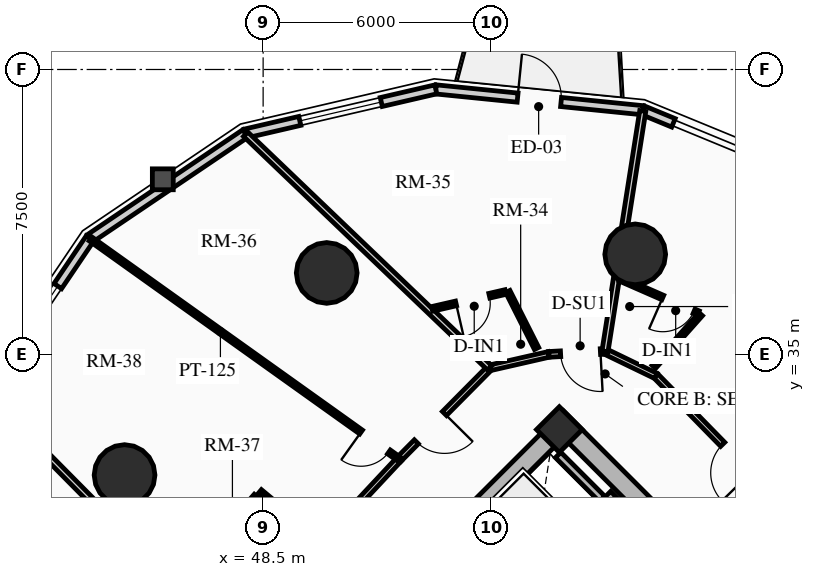
"""IFC4 building model, lengths in metres.
Left out: names, types, materials, properties, quantities, classifications, styles, units other than length and angle.
Written with IfcOpenShell. Run it as: python <this file> out.ifc"""

import sys

from ifc_helpers import new_model, si_unit, direction, frame, frame_2d, origin, origin_2d, place, context, subcontext, project, spatial, rectangle, circle, extrude, source, transform, mapped, element, fill, save


model = new_model("IFC4")
c1 = context("Model", 3, precision=1e-05, world=origin(), true_north=direction((0.0, 1.0)))
c2 = subcontext(c1, "Body", "Model", "MODEL_VIEW")
j1 = project(units=[si_unit("LENGTHUNIT", "METRE"), si_unit("PLANEANGLEUNIT", "RADIAN")], contexts=[c1])
p1 = place(None, origin())
s1 = spatial("IfcSite", under=j1, at=p1, CompositionType="ELEMENT")
p2 = place(p1, origin())
s2 = spatial("IfcBuilding", under=s1, at=p2, CompositionType="ELEMENT")
p3 = place(p2, frame((0.0, 0.0, 51.1)))
s3 = spatial("IfcBuildingStorey", under=s2, at=p3, CompositionType="ELEMENT", Elevation=51.1)
p4 = place(p3, frame((66.339, 23.227, 0.0), z_axis=(0.0, 0.0, 1.0), x_axis=(-0.707106781187, 0.707106781187, 0.0)))
e1 = element("IfcWall", 1, at=p4, inside=s3, PredefinedType="SHEAR", context=c2, shape_type="SweptSolid", body=[
    extrude(rectangle(XDim=14.3, YDim=0.5, at=frame_2d((7.15, 0.0))), origin(), (0.0, 0.0, 1.0), 2.91),
])
p5 = place(p3, frame((48.838, 25.596, 0.0), z_axis=(0.0, 0.0, 1.0), x_axis=(0.707106781187, 0.707106781187, 0.0)))
e2 = element("IfcWall", 2, at=p5, inside=s3, PredefinedType="SHEAR", context=c2, shape_type="SweptSolid", body=[
    extrude(rectangle(XDim=10.7, YDim=0.5, at=frame_2d((5.35, 0.0))), origin(), (0.0, 0.0, 1.0), 2.91),
])
m1 = source(origin(), c2, "Body", "SweptSolid", [
    extrude(rectangle(XDim=1.5, YDim=2.02, at=frame_2d((0.75, 1.01))), frame((0.0, 0.26, 0.0), z_axis=(0.0, -1.0, 0.0), x_axis=(1.0, 0.0, 0.0)), (0.0, 0.0, 1.0), 0.52),
])
p6 = place(p5, frame((4.6, 0.0, 0.0)))
e3 = element("IfcOpeningElement", 3, at=p6, cuts=e2, PredefinedType="OPENING", context=c2, shape_type="MappedRepresentation", body=[
    mapped(m1, transform((0.0, 0.0, 0.0), x_axis=(1.0, 0.0, 0.0), y_axis=(0.0, 1.0, 0.0), z_axis=(0.0, 0.0, 1.0), scale=1.0)),
])
p7 = place(p3, frame((56.294, 33.024, 0.0), z_axis=(0.0, 0.0, 1.0), x_axis=(0.707106781187, 0.707106781187, 0.0)))
e4 = element("IfcColumn", 4, at=p7, inside=s3, PredefinedType="COLUMN", context=c2, shape_type="SweptSolid", body=[
    extrude(rectangle(XDim=0.85, YDim=0.85, at=origin_2d()), origin(), (0.0, 0.0, 1.0), 2.91),
])
for number, where, z_axis, x_axis in (
    (5, (58.291, 37.635, 0.0), (0.0, 0.0, 1.0), (1.0, 0.0, 0.0)),
    (6, (50.173, 37.146, 0.0), (0.0, 0.0, 1.0), (1.0, 0.0, 0.0)),
    (7, (44.854, 31.827, 0.0), (0.0, 0.0, 1.0), (1.0, 0.0, 0.0)),
):
    element("IfcColumn", number, at=place(p3, frame(where, z_axis=z_axis, x_axis=x_axis)), inside=s3, PredefinedType="USERDEFINED", context=c2, shape_type="SweptSolid", body=[
        extrude(circle(Radius=0.8, at=origin_2d()), origin(), (0.0, 0.0, 1.0), 2.91),
    ])
p8 = place(p3, frame((58.493, 41.428, 0.0), z_axis=(0.0, 0.0, 1.0), x_axis=(0.924556017656, -0.381046152345, 0.0)))
e8 = element("IfcWall", 8, at=p8, inside=s3, PredefinedType="SOLIDWALL", context=c2, shape_type="SweptSolid", body=[
    extrude(rectangle(XDim=0.87, YDim=0.24, at=frame_2d((0.435, 0.0))), origin(), (0.0, 0.0, 1.0), 2.073),
])
p9 = place(p3, frame((53.043, 41.976, 0.0), z_axis=(0.0, 0.0, 1.0), x_axis=(0.994970765694, -0.100165739718, 0.0)))
e9 = element("IfcWall", 9, at=p9, inside=s3, PredefinedType="SOLIDWALL", context=c2, shape_type="SweptSolid", body=[
    extrude(rectangle(XDim=5.477, YDim=0.24, at=frame_2d((2.738, 0.0))), origin(), (0.0, 0.0, 1.0), 2.073),
])
m2 = source(origin(), c2, "Body", "SweptSolid", [
    extrude(rectangle(XDim=1.15, YDim=2.005, at=frame_2d((0.575, 1.002))), frame((0.0, 0.13, 0.0), z_axis=(0.0, -1.0, 0.0), x_axis=(1.0, 0.0, 0.0)), (0.0, 0.0, 1.0), 0.26),
])
p10 = place(p9, frame((2.163, 0.0, 0.0)))
e10 = element("IfcOpeningElement", 10, at=p10, cuts=e9, PredefinedType="OPENING", context=c2, shape_type="MappedRepresentation", body=[
    mapped(m2, transform((0.0, 0.0, 0.0), x_axis=(1.0, 0.0, 0.0), y_axis=(0.0, 1.0, 0.0), z_axis=(0.0, 0.0, 1.0), scale=1.0)),
])
p11 = place(p3, frame((48.031, 40.814, 0.0), z_axis=(0.0, 0.0, 1.0), x_axis=(0.974166016949, 0.225833060959, 0.0)))
e11 = element("IfcWall", 11, at=p11, inside=s3, PredefinedType="SOLIDWALL", context=c2, shape_type="SweptSolid", body=[
    extrude(rectangle(XDim=5.146, YDim=0.24, at=frame_2d((2.573, 0.0))), origin(), (0.0, 0.0, 1.0), 2.073),
])
m3 = source(origin(), c2, "Body", "SweptSolid", [
    extrude(rectangle(XDim=2.2, YDim=1.35, at=frame_2d((1.1, 0.675))), frame((0.0, 0.13, 0.0), z_axis=(0.0, -1.0, 0.0), x_axis=(1.0, 0.0, 0.0)), (0.0, 0.0, 1.0), 0.26),
])
p12 = place(p11, frame((1.473, 0.0, 0.65)))
e12 = element("IfcOpeningElement", 12, at=p12, cuts=e11, PredefinedType="OPENING", context=c2, shape_type="MappedRepresentation", body=[
    mapped(m3, transform((0.0, 0.0, 0.0), x_axis=(1.0, 0.0, 0.0), y_axis=(0.0, 1.0, 0.0), z_axis=(0.0, 0.0, 1.0), scale=1.0)),
])
p13 = place(p3, frame((43.945, 38.055, 0.0), z_axis=(0.0, 0.0, 1.0), x_axis=(0.828736708604, 0.559638693991, 0.0)))
e13 = element("IfcWall", 13, at=p13, inside=s3, PredefinedType="SOLIDWALL", context=c2, shape_type="SweptSolid", body=[
    extrude(rectangle(XDim=4.93, YDim=0.24, at=frame_2d((2.465, 0.0))), origin(), (0.0, 0.0, 1.0), 2.073),
])
p14 = place(p3, frame((41.186, 33.969, 0.0), z_axis=(0.0, 0.0, 1.0), x_axis=(0.559638693991, 0.828736708604, 0.0)))
e14 = element("IfcWall", 14, at=p14, inside=s3, PredefinedType="SOLIDWALL", context=c2, shape_type="SweptSolid", body=[
    extrude(rectangle(XDim=4.93, YDim=0.24, at=frame_2d((2.465, 0.0))), origin(), (0.0, 0.0, 1.0), 2.073),
])
m4 = source(origin(), c2, "Body", "SweptSolid", [
    extrude(rectangle(XDim=1.9, YDim=1.35, at=frame_2d((0.95, 0.675))), frame((0.0, 0.13, 0.0), z_axis=(0.0, -1.0, 0.0), x_axis=(1.0, 0.0, 0.0)), (0.0, 0.0, 1.0), 0.26),
])
p15 = place(p14, frame((1.515, 0.0, 0.65)))
e15 = element("IfcOpeningElement", 15, at=p15, cuts=e14, PredefinedType="OPENING", context=c2, shape_type="MappedRepresentation", body=[
    mapped(m4, transform((0.0, 0.0, 0.0), x_axis=(1.0, 0.0, 0.0), y_axis=(0.0, 1.0, 0.0), z_axis=(0.0, 0.0, 1.0), scale=1.0)),
])
p16 = place(p3, frame((55.615, 29.227, 0.0), z_axis=(0.0, 0.0, 1.0), x_axis=(0.707147878904, 0.70706568108, 0.0)))
e16 = element("IfcWall", 16, at=p16, inside=s3, PredefinedType="SHEAR", context=c2, shape_type="SweptSolid", body=[
    extrude(rectangle(XDim=2.97, YDim=0.2, at=frame_2d((1.485, 0.0))), origin(), (0.0, 0.0, 1.0), 2.91),
])
p17 = place(p3, frame((57.419, 31.2, 0.0), z_axis=(0.0, 0.0, 1.0), x_axis=(-0.707032117043, 0.707181437447, 0.0)))
e17 = element("IfcWall", 17, at=p17, inside=s3, PredefinedType="SHEAR", context=c2, shape_type="SweptSolid", body=[
    extrude(rectangle(XDim=1.635, YDim=0.2, at=frame_2d((0.817, 0.0))), origin(), (0.0, 0.0, 1.0), 2.91),
])
p18 = place(p3, frame((63.086, 30.086, 0.0), z_axis=(0.0, 0.0, 1.0), x_axis=(-0.699032802832, 0.715089603172, 0.0)))
e18 = element("IfcWall", 18, at=p18, inside=s3, PredefinedType="PARTITIONING", context=c2, shape_type="SweptSolid", body=[
    extrude(rectangle(XDim=6.082, YDim=0.15, at=frame_2d((3.041, 0.0))), origin(), (0.0, 0.0, 1.0), 2.159),
])
m5 = source(origin(), c2, "Body", "SweptSolid", [
    extrude(rectangle(XDim=1.05, YDim=2.015, at=frame_2d((0.525, 1.007))), frame((0.0, 0.085, 0.0), z_axis=(0.0, -1.0, 0.0), x_axis=(1.0, 0.0, 0.0)), (0.0, 0.0, 1.0), 0.17),
])
p19 = place(p18, frame((2.516, 0.0, 0.0)))
e19 = element("IfcOpeningElement", 19, at=p19, cuts=e18, PredefinedType="OPENING", context=c2, shape_type="MappedRepresentation", body=[
    mapped(m5, transform((0.0, 0.0, 0.0), x_axis=(1.0, 0.0, 0.0), y_axis=(0.0, 1.0, 0.0), z_axis=(0.0, 0.0, 1.0), scale=1.0)),
])
p20 = place(p3, frame((58.835, 34.435, 0.0), z_axis=(0.0, 0.0, 1.0), x_axis=(-0.900352167336, 0.4351620098, 0.0)))
e20 = element("IfcWall", 20, at=p20, inside=s3, PredefinedType="PARTITIONING", context=c2, shape_type="SweptSolid", body=[
    extrude(rectangle(XDim=1.488, YDim=0.15, at=frame_2d((0.744, 0.0))), origin(), (0.0, 0.0, 1.0), 2.205),
])
p21 = place(p3, frame((57.495, 35.083, 0.0), z_axis=(0.0, 0.0, 1.0), x_axis=(-0.998536503254, -0.054081897798, 0.0)))
e21 = element("IfcWall", 21, at=p21, inside=s3, PredefinedType="PARTITIONING", context=c2, shape_type="SweptSolid", body=[
    extrude(rectangle(XDim=1.481, YDim=0.15, at=frame_2d((0.74, 0.0))), origin(), (0.0, 0.0, 1.0), 2.159),
])
p22 = place(p21, frame((0.12, 0.0, 0.0)))
e22 = element("IfcOpeningElement", 22, at=p22, cuts=e21, PredefinedType="OPENING", context=c2, shape_type="MappedRepresentation", body=[
    mapped(m5, transform((0.0, 0.0, 0.0), x_axis=(1.0, 0.0, 0.0), y_axis=(0.0, 1.0, 0.0), z_axis=(0.0, 0.0, 1.0), scale=1.0)),
])
p23 = place(p3, frame((56.017, 35.003, 0.0), z_axis=(0.0, 0.0, 1.0), x_axis=(-0.974924954781, -0.222533890777, 0.0)))
e23 = element("IfcWall", 23, at=p23, inside=s3, PredefinedType="PARTITIONING", context=c2, shape_type="SweptSolid", body=[
    extrude(rectangle(XDim=1.595, YDim=0.15, at=frame_2d((0.798, 0.0))), origin(), (0.0, 0.0, 1.0), 2.205),
])
p24 = place(p3, frame((54.461, 34.648, 0.0), z_axis=(0.0, 0.0, 1.0), x_axis=(-0.70403409755, -0.710166170334, 0.0)))
e24 = element("IfcWall", 24, at=p24, inside=s3, PredefinedType="PARTITIONING", context=c2, shape_type="SweptSolid", body=[
    extrude(rectangle(XDim=3.384, YDim=0.15, at=frame_2d((1.692, 0.0))), origin(), (0.0, 0.0, 1.0), 2.159),
])
p25 = place(p24, frame((1.691, 0.0, 0.0)))
e25 = element("IfcOpeningElement", 25, at=p25, cuts=e24, PredefinedType="OPENING", context=c2, shape_type="MappedRepresentation", body=[
    mapped(m5, transform((0.0, 0.0, 0.0), x_axis=(1.0, 0.0, 0.0), y_axis=(0.0, 1.0, 0.0), z_axis=(0.0, 0.0, 1.0), scale=1.0)),
])
p26 = place(p3, frame((52.079, 32.244, 0.0), z_axis=(0.0, 0.0, 1.0), x_axis=(-0.682703325574, -0.730695674854, 0.0)))
e26 = element("IfcWall", 26, at=p26, inside=s3, PredefinedType="PARTITIONING", context=c2, shape_type="SweptSolid", body=[
    extrude(rectangle(XDim=6.527, YDim=0.15, at=frame_2d((3.263, 0.0))), origin(), (0.0, 0.0, 1.0), 2.159),
])
p27 = place(p3, frame((57.495, 35.083, 0.0), z_axis=(0.0, 0.0, 1.0), x_axis=(0.155296837382, 0.987867851638, 0.0)))
e27 = element("IfcWall", 27, at=p27, inside=s3, PredefinedType="PARTITIONING", context=c2, shape_type="SweptSolid", body=[
    extrude(rectangle(XDim=6.403, YDim=0.16, at=frame_2d((3.202, 0.0))), origin(), (0.0, 0.0, 1.0), 2.073),
])
p28 = place(p3, frame((54.461, 34.648, 0.0), z_axis=(0.0, 0.0, 1.0), x_axis=(-0.722290498621, 0.691589788532, 0.0)))
e28 = element("IfcWall", 28, at=p28, inside=s3, PredefinedType="PARTITIONING", context=c2, shape_type="SweptSolid", body=[
    extrude(rectangle(XDim=8.891, YDim=0.16, at=frame_2d((4.445, 0.0))), origin(), (0.0, 0.0, 1.0), 2.073),
])
p29 = place(p3, frame((47.623, 27.475, 0.0), z_axis=(0.0, 0.0, 1.0), x_axis=(-0.703512438021, 0.71068294587, 0.0)))
e29 = element("IfcWall", 29, at=p29, inside=s3, PredefinedType="PARTITIONING", context=c2, shape_type="SweptSolid", body=[
    extrude(rectangle(XDim=9.125, YDim=0.16, at=frame_2d((4.562, 0.0))), origin(), (0.0, 0.0, 1.0), 2.073),
])
p30 = place(p3, frame((55.695, 35.158, 0.0), z_axis=(0.0, 0.0, 1.0), x_axis=(-0.450698346964, 0.892676313142, 0.0)))
e30 = element("IfcWall", 30, at=p30, inside=s3, PredefinedType="PARTITIONING", context=c2, shape_type="SweptSolid", body=[
    extrude(rectangle(XDim=1.68, YDim=0.125, at=frame_2d((0.84, 0.0))), origin(), (0.0, 0.0, 1.0), 2.205),
])
p31 = place(p3, frame((54.878, 36.644, 0.0), z_axis=(0.0, 0.0, 1.0), x_axis=(-0.974554917581, -0.224148862631, 0.0)))
e31 = element("IfcWall", 31, at=p31, inside=s3, PredefinedType="PARTITIONING", context=c2, shape_type="SweptSolid", body=[
    extrude(rectangle(XDim=1.982, YDim=0.125, at=frame_2d((0.991, 0.0))), origin(), (0.0, 0.0, 1.0), 2.635),
])
m6 = source(origin(), c2, "Body", "SweptSolid", [
    extrude(rectangle(XDim=0.9, YDim=2.005, at=frame_2d((0.45, 1.002))), frame((0.0, 0.073, 0.0), z_axis=(0.0, -1.0, 0.0), x_axis=(1.0, 0.0, 0.0)), (0.0, 0.0, 1.0), 0.145),
])
p32 = place(p31, frame((0.436, 0.0, 0.0)))
e32 = element("IfcOpeningElement", 32, at=p32, cuts=e31, PredefinedType="OPENING", context=c2, shape_type="MappedRepresentation", body=[
    mapped(m6, transform((0.0, 0.0, 0.0), x_axis=(1.0, 0.0, 0.0), y_axis=(0.0, 1.0, 0.0), z_axis=(0.0, 0.0, 1.0), scale=1.0)),
])
p33 = place(p3, frame((52.079, 32.244, 0.0), z_axis=(0.0, 0.0, 1.0), x_axis=(-0.813888867537, 0.581020577346, 0.0)))
e33 = element("IfcWall", 33, at=p33, inside=s3, PredefinedType="PARTITIONING", context=c2, shape_type="SweptSolid", body=[
    extrude(rectangle(XDim=9.977, YDim=0.125, at=frame_2d((4.988, 0.0))), origin(), (0.0, 0.0, 1.0), 2.073),
])
p34 = place(p33, frame((0.33, 0.0, 0.0)))
e34 = element("IfcOpeningElement", 34, at=p34, cuts=e33, PredefinedType="OPENING", context=c2, shape_type="MappedRepresentation", body=[
    mapped(m6, transform((0.0, 0.0, 0.0), x_axis=(1.0, 0.0, 0.0), y_axis=(0.0, 1.0, 0.0), z_axis=(0.0, 0.0, 1.0), scale=1.0)),
])
p35 = place(p3, frame((49.809, 30.234, 0.0), z_axis=(0.0, 0.0, 1.0), x_axis=(-0.76830950514, 0.640078514177, 0.0)))
e35 = element("IfcWall", 35, at=p35, inside=s3, PredefinedType="PARTITIONING", context=c2, shape_type="SweptSolid", body=[
    extrude(rectangle(XDim=1.814, YDim=0.125, at=frame_2d((0.907, 0.0))), origin(), (0.0, 0.0, 1.0), 2.635),
])
p36 = place(p3, frame((48.313, 31.28, 0.0), z_axis=(0.0, 0.0, 1.0), x_axis=(-0.662230126621, -0.749300513409, 0.0)))
e36 = element("IfcWall", 36, at=p36, inside=s3, PredefinedType="PARTITIONING", context=c2, shape_type="SweptSolid", body=[
    extrude(rectangle(XDim=2.958, YDim=0.125, at=frame_2d((1.479, 0.0))), origin(), (0.0, 0.0, 1.0), 2.159),
])
p37 = place(p36, frame((0.12, 0.0, 0.0)))
e37 = element("IfcOpeningElement", 37, at=p37, cuts=e36, PredefinedType="OPENING", context=c2, shape_type="MappedRepresentation", body=[
    mapped(m6, transform((0.0, 0.0, 0.0), x_axis=(1.0, 0.0, 0.0), y_axis=(0.0, 1.0, 0.0), z_axis=(0.0, 0.0, 1.0), scale=1.0)),
])
p38 = place(p3, frame((58.78, 34.676, 0.0), z_axis=(0.0, 0.0, 1.0), x_axis=(0.6649433297, 0.746893813261, 0.0)))
e38 = element("IfcWall", 38, at=p38, inside=s3, PredefinedType="PARTITIONING", context=c2, shape_type="SweptSolid", body=[
    extrude(rectangle(XDim=1.856, YDim=0.125, at=frame_2d((0.928, 0.0))), origin(), (0.0, 0.0, 1.0), 2.205),
])
p39 = place(p3, frame((59.95, 36.09, 0.0), z_axis=(0.0, 0.0, 1.0), x_axis=(-0.916037613906, 0.401092370795, 0.0)))
e39 = element("IfcWall", 39, at=p39, inside=s3, PredefinedType="PARTITIONING", context=c2, shape_type="SweptSolid", body=[
    extrude(rectangle(XDim=2.247, YDim=0.125, at=frame_2d((1.124, 0.0))), origin(), (0.0, 0.0, 1.0), 2.159),
])
p40 = place(p39, frame((0.12, 0.0, 0.0)))
e40 = element("IfcOpeningElement", 40, at=p40, cuts=e39, PredefinedType="OPENING", context=c2, shape_type="MappedRepresentation", body=[
    mapped(m6, transform((0.0, 0.0, 0.0), x_axis=(1.0, 0.0, 0.0), y_axis=(0.0, 1.0, 0.0), z_axis=(0.0, 0.0, 1.0), scale=1.0)),
])
m7 = source(origin(), c2, "Body", "SweptSolid", [
    extrude(rectangle(XDim=1.15, YDim=2.005, at=frame_2d((0.575, 1.002))), frame((0.0, 0.025, 0.0), z_axis=(0.0, -1.0, 0.0), x_axis=(1.0, 0.0, 0.0)), (0.0, 0.0, 1.0), 0.05),
])
p41 = place(p10, origin())
e41 = element("IfcDoor", 41, at=p41, inside=s3, OperationType="SINGLE_SWING_LEFT", PredefinedType="DOOR", context=c2, shape_type="MappedRepresentation", body=[
    mapped(m7, transform((0.0, 0.0, 0.0), x_axis=(1.0, 0.0, 0.0), y_axis=(0.0, 1.0, 0.0), z_axis=(0.0, 0.0, 1.0), scale=1.0)),
])
fill(e10, e41)
m8 = source(origin(), c2, "Body", "SweptSolid", [
    extrude(rectangle(XDim=2.2, YDim=1.35, at=frame_2d((1.1, 0.675))), frame((0.0, 0.03, 0.0), z_axis=(0.0, -1.0, 0.0), x_axis=(1.0, 0.0, 0.0)), (0.0, 0.0, 1.0), 0.06),
])
p42 = place(p12, origin())
e42 = element("IfcWindow", 42, at=p42, inside=s3, PartitioningType="DOUBLE_PANEL_VERTICAL", PredefinedType="WINDOW", context=c2, shape_type="MappedRepresentation", body=[
    mapped(m8, transform((0.0, 0.0, 0.0), x_axis=(1.0, 0.0, 0.0), y_axis=(0.0, 1.0, 0.0), z_axis=(0.0, 0.0, 1.0), scale=1.0)),
])
fill(e12, e42)
m9 = source(origin(), c2, "Body", "SweptSolid", [
    extrude(rectangle(XDim=1.9, YDim=1.35, at=frame_2d((0.95, 0.675))), frame((0.0, 0.03, 0.0), z_axis=(0.0, -1.0, 0.0), x_axis=(1.0, 0.0, 0.0)), (0.0, 0.0, 1.0), 0.06),
])
p43 = place(p15, origin())
e43 = element("IfcWindow", 43, at=p43, inside=s3, PartitioningType="DOUBLE_PANEL_VERTICAL", PredefinedType="WINDOW", context=c2, shape_type="MappedRepresentation", body=[
    mapped(m9, transform((0.0, 0.0, 0.0), x_axis=(1.0, 0.0, 0.0), y_axis=(0.0, 1.0, 0.0), z_axis=(0.0, 0.0, 1.0), scale=1.0)),
])
fill(e15, e43)
m10 = source(origin(), c2, "Body", "SweptSolid", [
    extrude(rectangle(XDim=1.05, YDim=2.015, at=frame_2d((0.525, 1.007))), frame((0.0, 0.025, 0.0), z_axis=(0.0, -1.0, 0.0), x_axis=(1.0, 0.0, 0.0)), (0.0, 0.0, 1.0), 0.05),
])
p44 = place(p22, origin())
e44 = element("IfcDoor", 44, at=p44, inside=s3, OperationType="SINGLE_SWING_LEFT", PredefinedType="DOOR", context=c2, shape_type="MappedRepresentation", body=[
    mapped(m10, transform((0.0, 0.0, 0.0), x_axis=(1.0, 0.0, 0.0), y_axis=(0.0, 1.0, 0.0), z_axis=(0.0, 0.0, 1.0), scale=1.0)),
])
fill(e22, e44)
m11 = source(origin(), c2, "Body", "SweptSolid", [
    extrude(rectangle(XDim=0.9, YDim=2.005, at=frame_2d((0.45, 1.002))), frame((0.0, 0.025, 0.0), z_axis=(0.0, -1.0, 0.0), x_axis=(1.0, 0.0, 0.0)), (0.0, 0.0, 1.0), 0.05),
])
p45 = place(p32, origin())
e45 = element("IfcDoor", 45, at=p45, inside=s3, OperationType="SINGLE_SWING_RIGHT", PredefinedType="DOOR", context=c2, shape_type="MappedRepresentation", body=[
    mapped(m11, transform((0.0, 0.0, 0.0), x_axis=(1.0, 0.0, 0.0), y_axis=(0.0, 1.0, 0.0), z_axis=(0.0, 0.0, 1.0), scale=1.0)),
])
fill(e32, e45)
p46 = place(p25, origin())
e46 = element("IfcDoor", 46, at=p46, inside=s3, OperationType="SINGLE_SWING_LEFT", PredefinedType="DOOR", context=c2, shape_type="MappedRepresentation", body=[
    mapped(m10, transform((0.0, 0.0, 0.0), x_axis=(1.0, 0.0, 0.0), y_axis=(0.0, 1.0, 0.0), z_axis=(0.0, 0.0, 1.0), scale=1.0)),
])
fill(e25, e46)
p47 = place(p34, origin())
e47 = element("IfcDoor", 47, at=p47, inside=s3, OperationType="SINGLE_SWING_RIGHT", PredefinedType="DOOR", context=c2, shape_type="MappedRepresentation", body=[
    mapped(m11, transform((0.0, 0.0, 0.0), x_axis=(1.0, 0.0, 0.0), y_axis=(0.0, 1.0, 0.0), z_axis=(0.0, 0.0, 1.0), scale=1.0)),
])
fill(e34, e47)
p48 = place(p19, origin())
e48 = element("IfcDoor", 48, at=p48, inside=s3, OperationType="SINGLE_SWING_LEFT", PredefinedType="DOOR", context=c2, shape_type="MappedRepresentation", body=[
    mapped(m10, transform((0.0, 0.0, 0.0), x_axis=(1.0, 0.0, 0.0), y_axis=(0.0, 1.0, 0.0), z_axis=(0.0, 0.0, 1.0), scale=1.0)),
])
fill(e19, e48)
p49 = place(p40, origin())
e49 = element("IfcDoor", 49, at=p49, inside=s3, OperationType="SINGLE_SWING_RIGHT", PredefinedType="DOOR", context=c2, shape_type="MappedRepresentation", body=[
    mapped(m11, transform((0.0, 0.0, 0.0), x_axis=(1.0, 0.0, 0.0), y_axis=(0.0, 1.0, 0.0), z_axis=(0.0, 0.0, 1.0), scale=1.0)),
])
fill(e40, e49)
save(model, sys.argv[1])
